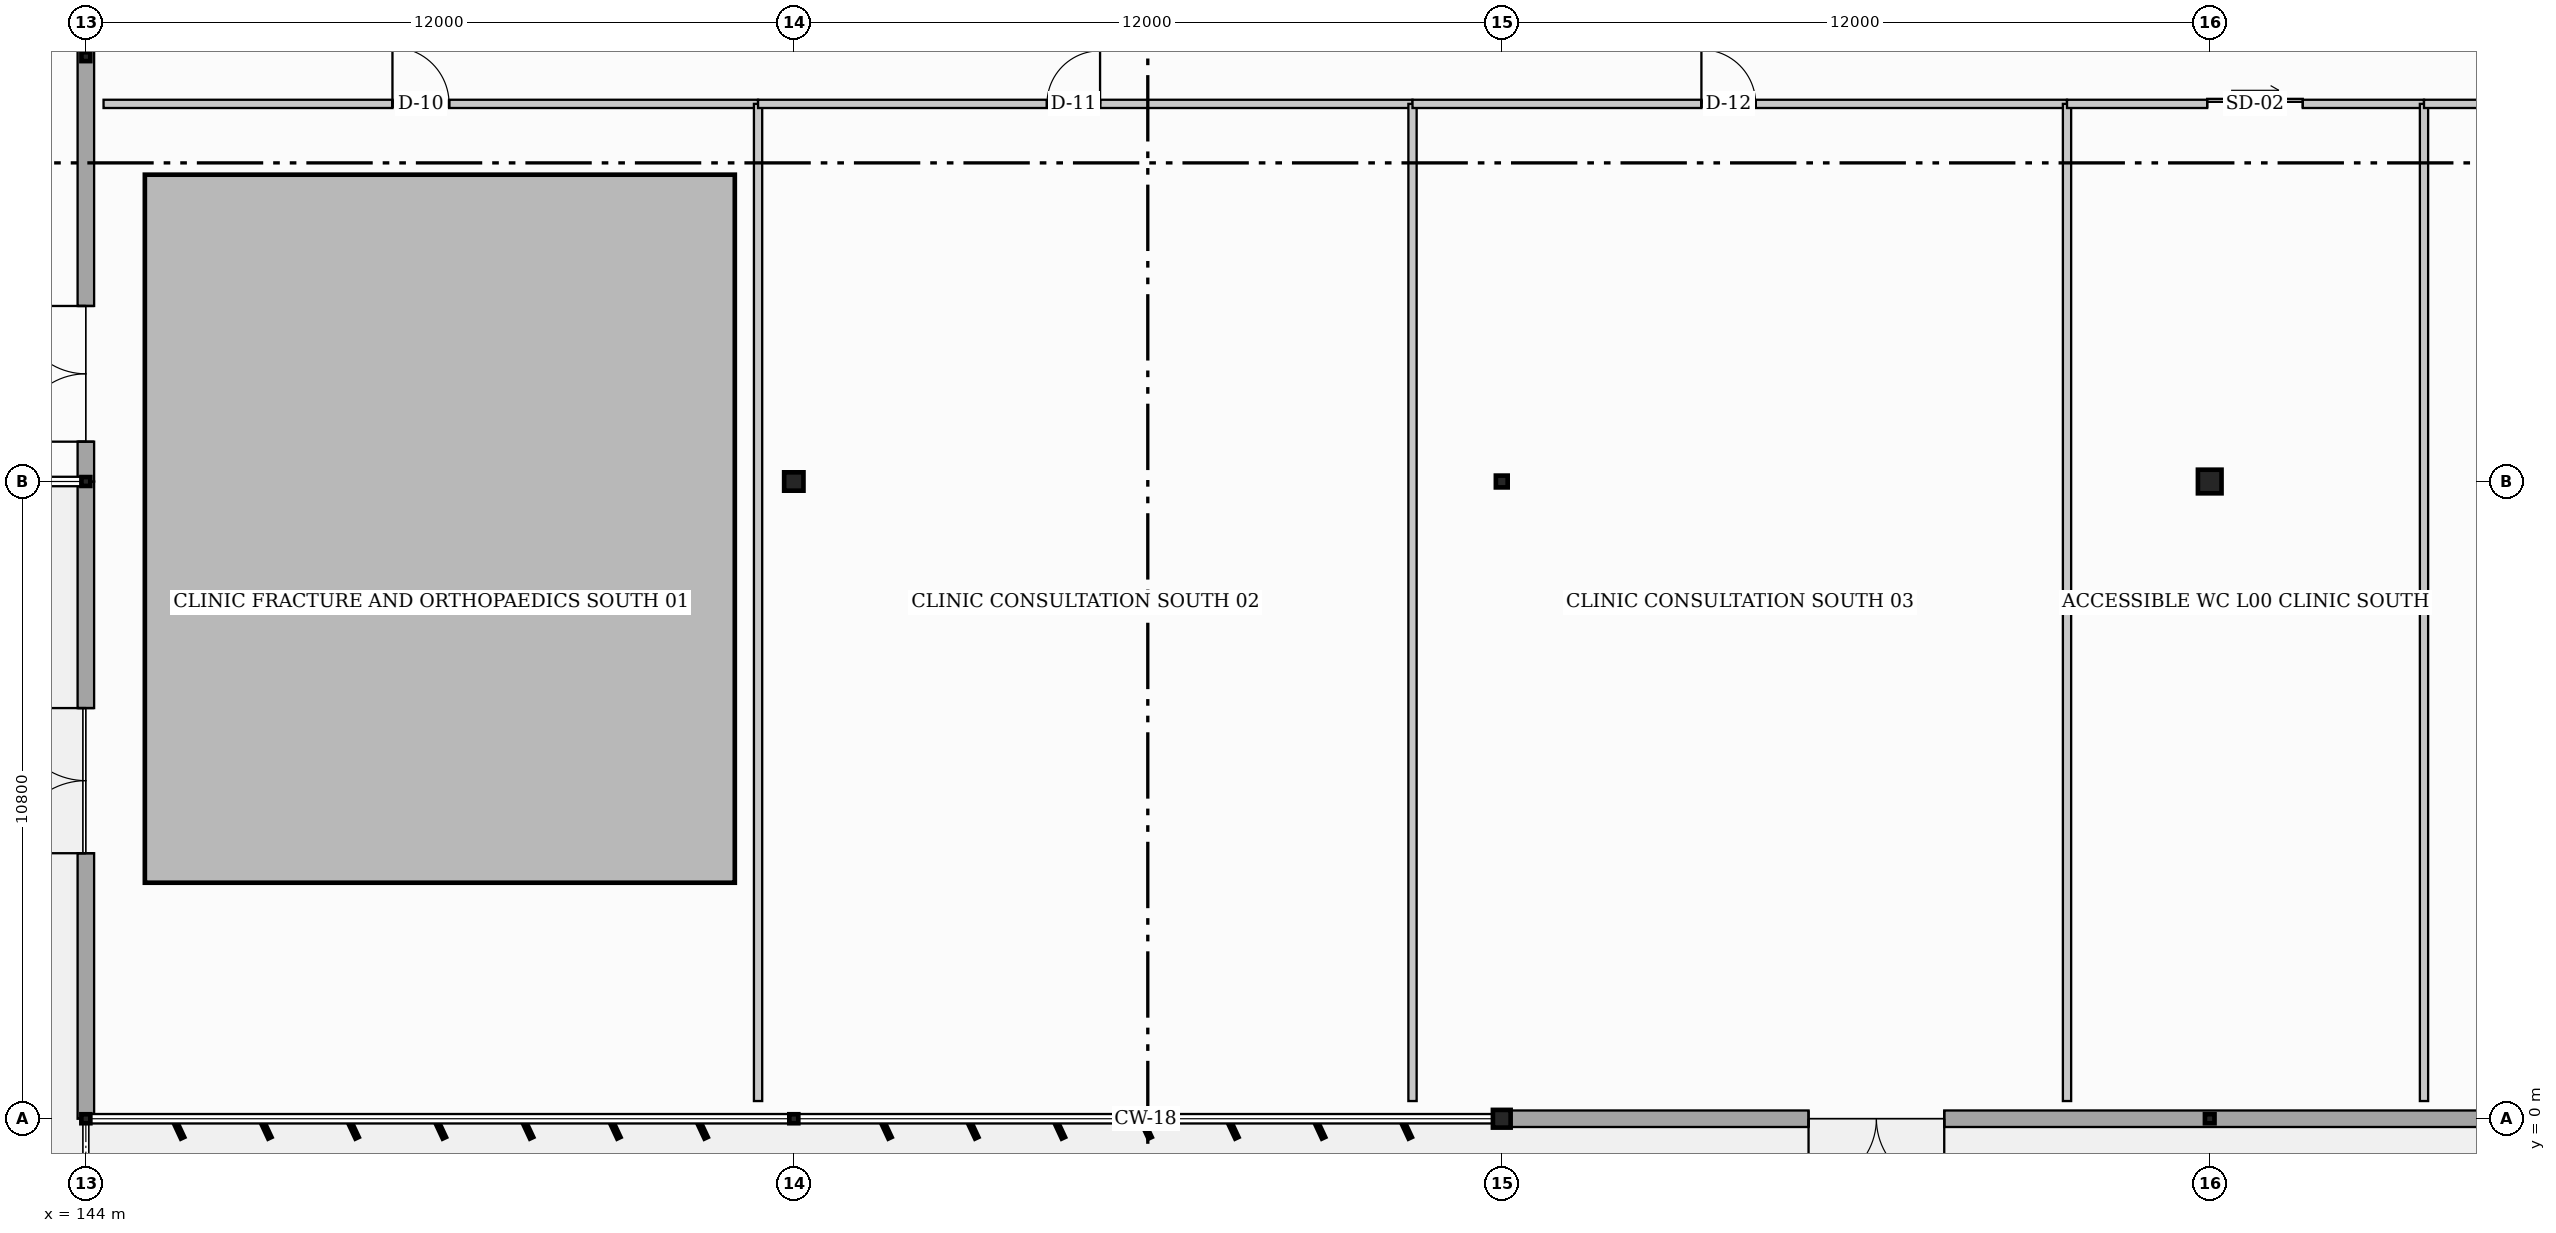
"""IFC4 building model, lengths in metres.
Left out: names, types, materials, properties, quantities, classifications, styles, units other than length and angle.
Written with IfcOpenShell. Run it as: python <this file> out.ifc"""

import sys

from ifc_helpers import new_model, si_unit, direction, frame, frame_2d, origin, origin_2d, place, context, subcontext, project, spatial, rectangle, hollow_rectangle, i_section, extrude, element, fill, save


model = new_model("IFC4")
c1 = context("Model", 3, precision=1e-05, world=origin(), true_north=direction((0.0, 1.0)))
c2 = subcontext(c1, "Body", "Model", "MODEL_VIEW")
j1 = project(units=[si_unit("LENGTHUNIT", "METRE"), si_unit("PLANEANGLEUNIT", "RADIAN")], contexts=[c1])
p1 = place(None, origin())
s1 = spatial("IfcSite", under=j1, at=p1, CompositionType="ELEMENT")
p2 = place(p1, origin())
s2 = spatial("IfcBuilding", under=s1, at=p2, CompositionType="ELEMENT")
p3 = place(p2, origin())
s3 = spatial("IfcBuildingStorey", under=s2, at=p3, CompositionType="ELEMENT", Elevation=0.0)
p4 = place(p3, frame((144.0, 0.0, 0.0), z_axis=(0.0, 0.0, 1.0), x_axis=(1.0, 0.0, 0.0)))
e1 = element("IfcColumn", 1, at=p4, inside=s3, PredefinedType="COLUMN", context=c2, shape_type="SweptSolid", body=[
    extrude(i_section(OverallWidth=0.152, OverallDepth=0.152, WebThickness=0.006, FlangeThickness=0.007, at=origin_2d()), origin(), (0.0, 0.0, 1.0), 4.8),
])
p5 = place(p3, frame((144.0, 10.8, 0.0), z_axis=(0.0, 0.0, 1.0), x_axis=(1.0, 0.0, 0.0)))
e2 = element("IfcColumn", 2, at=p5, inside=s3, PredefinedType="COLUMN", context=c2, shape_type="SweptSolid", body=[
    extrude(hollow_rectangle(XDim=0.15, YDim=0.15, WallThickness=0.008, at=origin_2d()), origin(), (0.0, 0.0, 1.0), 4.8),
])
p6 = place(p3, frame((156.0, 0.0, 0.0), z_axis=(0.0, 0.0, 1.0), x_axis=(0.0, 1.0, 0.0)))
e3 = element("IfcColumn", 3, at=p6, inside=s3, PredefinedType="COLUMN", context=c2, shape_type="SweptSolid", body=[
    extrude(i_section(OverallWidth=0.152, OverallDepth=0.152, WebThickness=0.006, FlangeThickness=0.007, at=origin_2d()), origin(), (0.0, 0.0, 1.0), 4.8),
])
p7 = place(p3, frame((156.0, 10.8, 0.0), z_axis=(0.0, 0.0, 1.0), x_axis=(0.0, 1.0, 0.0)))
e4 = element("IfcColumn", 4, at=p7, inside=s3, PredefinedType="COLUMN", context=c2, shape_type="SweptSolid", body=[
    extrude(i_section(OverallWidth=0.311, OverallDepth=0.327, WebThickness=0.016, FlangeThickness=0.025, at=origin_2d()), origin(), (0.0, 0.0, 1.0), 4.8),
])
p8 = place(p3, frame((168.0, 0.0, 0.0), z_axis=(0.0, 0.0, 1.0), x_axis=(1.0, 0.0, 0.0)))
e5 = element("IfcColumn", 5, at=p8, inside=s3, PredefinedType="COLUMN", context=c2, shape_type="SweptSolid", body=[
    extrude(hollow_rectangle(XDim=0.3, YDim=0.3, WallThickness=0.012, at=origin_2d()), origin(), (0.0, 0.0, 1.0), 4.8),
])
p9 = place(p3, frame((168.0, 10.8, 0.0), z_axis=(0.0, 0.0, 1.0), x_axis=(1.0, 0.0, 0.0)))
e6 = element("IfcColumn", 6, at=p9, inside=s3, PredefinedType="COLUMN", context=c2, shape_type="SweptSolid", body=[
    extrude(hollow_rectangle(XDim=0.2, YDim=0.2, WallThickness=0.01, at=origin_2d()), origin(), (0.0, 0.0, 1.0), 4.8),
])
p10 = place(p3, frame((180.0, 0.0, 0.0), z_axis=(0.0, 0.0, 1.0), x_axis=(0.0, 1.0, 0.0)))
e7 = element("IfcColumn", 7, at=p10, inside=s3, PredefinedType="COLUMN", context=c2, shape_type="SweptSolid", body=[
    extrude(i_section(OverallWidth=0.154, OverallDepth=0.162, WebThickness=0.008, FlangeThickness=0.011, at=origin_2d()), origin(), (0.0, 0.0, 1.0), 4.8),
])
p11 = place(p3, frame((180.0, 10.8, 0.0), z_axis=(0.0, 0.0, 1.0), x_axis=(0.0, 1.0, 0.0)))
e8 = element("IfcColumn", 8, at=p11, inside=s3, PredefinedType="COLUMN", context=c2, shape_type="SweptSolid", body=[
    extrude(i_section(OverallWidth=0.4, OverallDepth=0.4, WebThickness=0.02, FlangeThickness=0.028, at=origin_2d()), origin(), (0.0, 0.0, 1.0), 4.8),
])
p12 = place(p3, frame((144.0, 18.0, 0.0), z_axis=(0.0, 0.0, 1.0), x_axis=(1.0, 0.0, 0.0)))
e9 = element("IfcColumn", 9, at=p12, inside=s3, PredefinedType="COLUMN", context=c2, shape_type="SweptSolid", body=[
    extrude(hollow_rectangle(XDim=0.15, YDim=0.15, WallThickness=0.008, at=origin_2d()), origin(), (0.0, 0.0, 1.0), 4.8),
])
p13 = place(p3, frame((192.0, 0.0, 0.0), z_axis=(0.0, 0.0, 1.0), x_axis=(-1.0, 0.0, 0.0)))
e10 = element("IfcWall", 10, at=p13, inside=s3, PredefinedType="STANDARD", context=c2, shape_type="SweptSolid", body=[
    extrude(rectangle(XDim=24.0, YDim=0.28, at=frame_2d((12.0, 0.0))), origin(), (0.0, 0.0, 1.0), 3.823),
])
p14 = place(p13, frame((5.0, 0.0, 0.0)))
e11 = element("IfcOpeningElement", 11, at=p14, cuts=e10, PredefinedType="OPENING", context=c2, shape_type="SweptSolid", body=[
    extrude(rectangle(XDim=2.3, YDim=2.3, at=frame_2d((1.15, 1.15))), frame((0.0, 0.15, 0.0), z_axis=(0.0, -1.0, 0.0), x_axis=(1.0, 0.0, 0.0)), (0.0, 0.0, 1.0), 0.3),
])
p15 = place(p13, frame((16.5, 0.0, 0.0)))
e12 = element("IfcOpeningElement", 12, at=p15, cuts=e10, PredefinedType="OPENING", context=c2, shape_type="SweptSolid", body=[
    extrude(rectangle(XDim=2.3, YDim=2.3, at=frame_2d((1.15, 1.15))), frame((0.0, 0.15, 0.0), z_axis=(0.0, -1.0, 0.0), x_axis=(1.0, 0.0, 0.0)), (0.0, 0.0, 1.0), 0.3),
])
p16 = place(p13, frame((1.1, 0.0, 0.95)))
e13 = element("IfcOpeningElement", 13, at=p16, cuts=e10, PredefinedType="OPENING", context=c2, shape_type="SweptSolid", body=[
    extrude(rectangle(XDim=3.0, YDim=0.9, at=frame_2d((1.5, 0.45))), frame((0.0, 0.15, 0.0), z_axis=(0.0, -1.0, 0.0), x_axis=(1.0, 0.0, 0.0)), (0.0, 0.0, 1.0), 0.3),
])
p17 = place(p3, frame((144.0, 0.0, 0.0), z_axis=(0.0, 0.0, 1.0), x_axis=(0.0, 1.0, 0.0)))
e14 = element("IfcWall", 14, at=p17, inside=s3, PredefinedType="STANDARD", context=c2, shape_type="SweptSolid", body=[
    extrude(rectangle(XDim=10.8, YDim=0.28, at=frame_2d((5.4, 0.0))), origin(), (0.0, 0.0, 1.0), 3.68),
])
p18 = place(p17, frame((4.5, 0.0, 0.0)))
e15 = element("IfcOpeningElement", 15, at=p18, cuts=e14, PredefinedType="OPENING", context=c2, shape_type="SweptSolid", body=[
    extrude(rectangle(XDim=2.46, YDim=2.4, at=frame_2d((1.23, 1.2))), frame((0.0, 0.15, 0.0), z_axis=(0.0, -1.0, 0.0), x_axis=(1.0, 0.0, 0.0)), (0.0, 0.0, 1.0), 0.3),
])
p19 = place(p3, frame((144.0, 10.8, 0.0), z_axis=(0.0, 0.0, 1.0), x_axis=(0.0, 1.0, 0.0)))
e16 = element("IfcWall", 16, at=p19, inside=s3, PredefinedType="STANDARD", context=c2, shape_type="SweptSolid", body=[
    extrude(rectangle(XDim=22.8, YDim=0.28, at=frame_2d((11.4, 0.0))), origin(), (0.0, 0.0, 1.0), 3.53),
])
p20 = place(p19, frame((0.675, 0.0, 0.0)))
e17 = element("IfcOpeningElement", 17, at=p20, cuts=e16, PredefinedType="OPENING", context=c2, shape_type="SweptSolid", body=[
    extrude(rectangle(XDim=2.3, YDim=2.3, at=frame_2d((1.15, 1.15))), frame((0.0, 0.15, 0.0), z_axis=(0.0, -1.0, 0.0), x_axis=(1.0, 0.0, 0.0)), (0.0, 0.0, 1.0), 0.3),
])
p21 = place(p3, frame((144.3, 17.2, 0.0), z_axis=(0.0, 0.0, 1.0), x_axis=(1.0, 0.0, 0.0)))
e18 = element("IfcWall", 18, at=p21, inside=s3, PredefinedType="PARTITIONING", context=c2, shape_type="SweptSolid", body=[
    extrude(rectangle(XDim=11.094, YDim=0.14, at=frame_2d((5.547, 0.0))), origin(), (0.0, 0.0, 1.0), 3.818),
])
p22 = place(p21, frame((4.897, 0.0, 0.0)))
e19 = element("IfcOpeningElement", 19, at=p22, cuts=e18, PredefinedType="OPENING", context=c2, shape_type="SweptSolid", body=[
    extrude(rectangle(XDim=0.96, YDim=2.06, at=frame_2d((0.48, 1.03))), frame((0.0, 0.08, 0.0), z_axis=(0.0, -1.0, 0.0), x_axis=(1.0, 0.0, 0.0)), (0.0, 0.0, 1.0), 0.16),
])
p23 = place(p3, frame((155.394, 0.3, 0.0), z_axis=(0.0, 0.0, 1.0), x_axis=(0.0, 1.0, 0.0)))
e20 = element("IfcWall", 20, at=p23, inside=s3, PredefinedType="PARTITIONING", context=c2, shape_type="SweptSolid", body=[
    extrude(rectangle(XDim=16.9, YDim=0.14, at=frame_2d((8.45, 0.0))), origin(), (0.0, 0.0, 1.0), 3.78),
])
p24 = place(p3, frame((155.394, 17.2, 0.0), z_axis=(0.0, 0.0, 1.0), x_axis=(1.0, 0.0, 0.0)))
e21 = element("IfcWall", 21, at=p24, inside=s3, PredefinedType="PARTITIONING", context=c2, shape_type="SweptSolid", body=[
    extrude(rectangle(XDim=11.093, YDim=0.14, at=frame_2d((5.546, 0.0))), origin(), (0.0, 0.0, 1.0), 3.823),
])
p25 = place(p24, frame((4.897, 0.0, 0.0)))
e22 = element("IfcOpeningElement", 22, at=p25, cuts=e21, PredefinedType="OPENING", context=c2, shape_type="SweptSolid", body=[
    extrude(rectangle(XDim=0.9, YDim=2.1, at=frame_2d((0.45, 1.05))), frame((0.0, 0.08, 0.0), z_axis=(0.0, -1.0, 0.0), x_axis=(1.0, 0.0, 0.0)), (0.0, 0.0, 1.0), 0.16),
])
p26 = place(p3, frame((166.487, 0.3, 0.0), z_axis=(0.0, 0.0, 1.0), x_axis=(0.0, 1.0, 0.0)))
e23 = element("IfcWall", 23, at=p26, inside=s3, PredefinedType="PARTITIONING", context=c2, shape_type="SweptSolid", body=[
    extrude(rectangle(XDim=16.9, YDim=0.14, at=frame_2d((8.45, 0.0))), origin(), (0.0, 0.0, 1.0), 3.53),
])
p27 = place(p3, frame((166.487, 17.2, 0.0), z_axis=(0.0, 0.0, 1.0), x_axis=(1.0, 0.0, 0.0)))
e24 = element("IfcWall", 24, at=p27, inside=s3, PredefinedType="PARTITIONING", context=c2, shape_type="SweptSolid", body=[
    extrude(rectangle(XDim=11.094, YDim=0.14, at=frame_2d((5.547, 0.0))), origin(), (0.0, 0.0, 1.0), 3.828),
])
p28 = place(p27, frame((4.897, 0.0, 0.0)))
e25 = element("IfcOpeningElement", 25, at=p28, cuts=e24, PredefinedType="OPENING", context=c2, shape_type="SweptSolid", body=[
    extrude(rectangle(XDim=0.92, YDim=2.04, at=frame_2d((0.46, 1.02))), frame((0.0, 0.08, 0.0), z_axis=(0.0, -1.0, 0.0), x_axis=(1.0, 0.0, 0.0)), (0.0, 0.0, 1.0), 0.16),
])
p29 = place(p3, frame((177.581, 0.3, 0.0), z_axis=(0.0, 0.0, 1.0), x_axis=(0.0, 1.0, 0.0)))
e26 = element("IfcWall", 26, at=p29, inside=s3, PredefinedType="PARTITIONING", context=c2, shape_type="SweptSolid", body=[
    extrude(rectangle(XDim=16.9, YDim=0.14, at=frame_2d((8.45, 0.0))), origin(), (0.0, 0.0, 1.0), 3.738),
])
p30 = place(p3, frame((177.581, 17.2, 0.0), z_axis=(0.0, 0.0, 1.0), x_axis=(1.0, 0.0, 0.0)))
e27 = element("IfcWall", 27, at=p30, inside=s3, PredefinedType="PARTITIONING", context=c2, shape_type="SweptSolid", body=[
    extrude(rectangle(XDim=6.051, YDim=0.14, at=frame_2d((3.025, 0.0))), origin(), (0.0, 0.0, 1.0), 3.897),
])
p31 = place(p30, frame((2.376, 0.0, 0.0)))
e28 = element("IfcOpeningElement", 28, at=p31, cuts=e27, PredefinedType="OPENING", context=c2, shape_type="SweptSolid", body=[
    extrude(rectangle(XDim=1.62, YDim=2.3, at=frame_2d((0.81, 1.15))), frame((0.0, 0.08, 0.0), z_axis=(0.0, -1.0, 0.0), x_axis=(1.0, 0.0, 0.0)), (0.0, 0.0, 1.0), 0.16),
])
p32 = place(p3, frame((183.632, 0.3, 0.0), z_axis=(0.0, 0.0, 1.0), x_axis=(0.0, 1.0, 0.0)))
e29 = element("IfcWall", 29, at=p32, inside=s3, PredefinedType="PARTITIONING", context=c2, shape_type="SweptSolid", body=[
    extrude(rectangle(XDim=16.9, YDim=0.14, at=frame_2d((8.45, 0.0))), origin(), (0.0, 0.0, 1.0), 3.818),
])
p33 = place(p3, frame((183.632, 17.2, 0.0), z_axis=(0.0, 0.0, 1.0), x_axis=(1.0, 0.0, 0.0)))
e30 = element("IfcWall", 30, at=p33, inside=s3, PredefinedType="PARTITIONING", context=c2, shape_type="SweptSolid", body=[
    extrude(rectangle(XDim=8.068, YDim=0.14, at=frame_2d((4.034, 0.0))), origin(), (0.0, 0.0, 1.0), 4.027),
])
p34 = place(p33, frame((3.384, 0.0, 0.0)))
e31 = element("IfcOpeningElement", 31, at=p34, cuts=e30, PredefinedType="OPENING", context=c2, shape_type="SweptSolid", body=[
    extrude(rectangle(XDim=1.48, YDim=2.26, at=frame_2d((0.74, 1.13))), frame((0.0, 0.08, 0.0), z_axis=(0.0, -1.0, 0.0), x_axis=(1.0, 0.0, 0.0)), (0.0, 0.0, 1.0), 0.16),
])
p35 = place(p15, origin())
e32 = element("IfcDoor", 32, at=p35, inside=s3, OperationType="DOUBLE_DOOR_SINGLE_SWING", PredefinedType="DOOR", context=c2, shape_type="SweptSolid", body=[
    extrude(rectangle(XDim=2.3, YDim=2.3, at=frame_2d((1.15, 1.15))), frame((0.0, 0.025, 0.0), z_axis=(0.0, -1.0, 0.0), x_axis=(1.0, 0.0, 0.0)), (0.0, 0.0, 1.0), 0.05),
])
fill(e12, e32)
p36 = place(p18, origin())
e33 = element("IfcDoor", 33, at=p36, inside=s3, OperationType="DOUBLE_DOOR_SINGLE_SWING", PredefinedType="DOOR", context=c2, shape_type="SweptSolid", body=[
    extrude(rectangle(XDim=2.46, YDim=2.4, at=frame_2d((1.23, 1.2))), frame((0.0, 0.025, 0.0), z_axis=(0.0, -1.0, 0.0), x_axis=(1.0, 0.0, 0.0)), (0.0, 0.0, 1.0), 0.05),
])
fill(e15, e33)
p37 = place(p20, origin())
e34 = element("IfcDoor", 34, at=p37, inside=s3, OperationType="DOUBLE_DOOR_SINGLE_SWING", PredefinedType="DOOR", context=c2, shape_type="SweptSolid", body=[
    extrude(rectangle(XDim=2.3, YDim=2.3, at=frame_2d((1.15, 1.15))), frame((0.0, 0.025, 0.0), z_axis=(0.0, -1.0, 0.0), x_axis=(1.0, 0.0, 0.0)), (0.0, 0.0, 1.0), 0.05),
])
fill(e17, e34)
p38 = place(p22, origin())
e35 = element("IfcDoor", 35, at=p38, inside=s3, OperationType="SINGLE_SWING_LEFT", PredefinedType="DOOR", context=c2, shape_type="SweptSolid", body=[
    extrude(rectangle(XDim=0.96, YDim=2.06, at=frame_2d((0.48, 1.03))), frame((0.0, 0.025, 0.0), z_axis=(0.0, -1.0, 0.0), x_axis=(1.0, 0.0, 0.0)), (0.0, 0.0, 1.0), 0.05),
])
fill(e19, e35)
p39 = place(p25, origin())
e36 = element("IfcDoor", 36, at=p39, inside=s3, OperationType="SINGLE_SWING_RIGHT", PredefinedType="DOOR", context=c2, shape_type="SweptSolid", body=[
    extrude(rectangle(XDim=0.9, YDim=2.1, at=frame_2d((0.45, 1.05))), frame((0.0, 0.025, 0.0), z_axis=(0.0, -1.0, 0.0), x_axis=(1.0, 0.0, 0.0)), (0.0, 0.0, 1.0), 0.05),
])
fill(e22, e36)
p40 = place(p28, origin())
e37 = element("IfcDoor", 37, at=p40, inside=s3, OperationType="SINGLE_SWING_LEFT", PredefinedType="DOOR", context=c2, shape_type="SweptSolid", body=[
    extrude(rectangle(XDim=0.92, YDim=2.04, at=frame_2d((0.46, 1.02))), frame((0.0, 0.025, 0.0), z_axis=(0.0, -1.0, 0.0), x_axis=(1.0, 0.0, 0.0)), (0.0, 0.0, 1.0), 0.05),
])
fill(e25, e37)
p41 = place(p31, origin())
e38 = element("IfcDoor", 38, at=p41, inside=s3, OperationType="SLIDING_TO_RIGHT", PredefinedType="DOOR", context=c2, shape_type="SweptSolid", body=[
    extrude(rectangle(XDim=1.62, YDim=2.3, at=frame_2d((0.81, 1.15))), frame((0.0, 0.025, 0.0), z_axis=(0.0, -1.0, 0.0), x_axis=(1.0, 0.0, 0.0)), (0.0, 0.0, 1.0), 0.05),
])
fill(e28, e38)
save(model, sys.argv[1])
